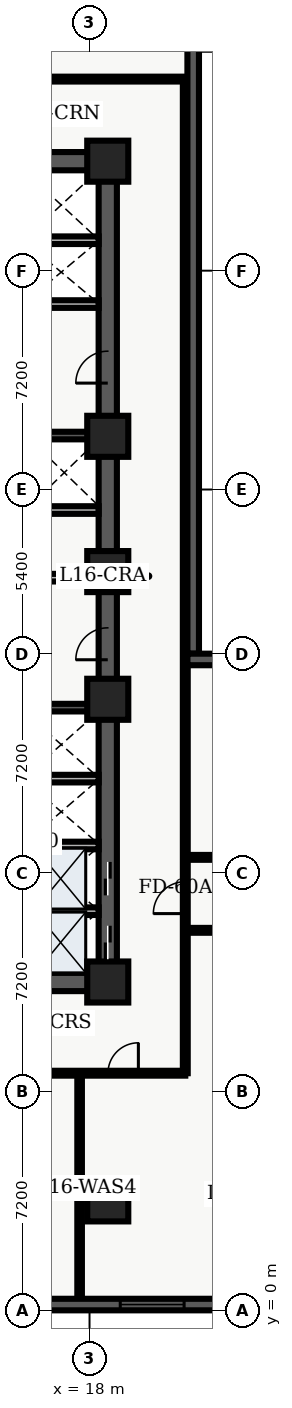
"""IFC4 building model, lengths in metres.
Left out: names, types, materials, properties, quantities, classifications, styles, units other than length and angle.
Written with IfcOpenShell. Run it as: python <this file> out.ifc"""

import sys

from ifc_helpers import new_model, entity, si_unit, converted_unit, direction, frame, origin_with_axes, origin_2d_with_axis, place, context, subcontext, project, spatial, polyline, rectangle, outline, extrude, element, fill, save


model = new_model("IFC4")
c1 = context("Model", 3, precision=1e-05, world=origin_with_axes(), true_north=direction((0.0, 1.0)))
c2 = subcontext(c1, "Body", "Model", "MODEL_VIEW")
j1 = project(units=[si_unit("LENGTHUNIT", "METRE"), converted_unit("PLANEANGLEUNIT", "DEGREE", entity("IfcPlaneAngleMeasure", 0.017), si_unit("PLANEANGLEUNIT", "RADIAN"), dimensions=[0, 0, 0, 0, 0, 0, 0])], contexts=[c1])
p1 = place(None, origin_with_axes())
s1 = spatial("IfcSite", under=j1, at=p1, CompositionType="ELEMENT")
p2 = place(p1, origin_with_axes())
s2 = spatial("IfcBuilding", under=s1, at=p2, CompositionType="ELEMENT")
p3 = place(p2, frame((0.0, 0.0, 67.8), z_axis=(0.0, 0.0, 1.0), x_axis=(1.0, 0.0, 0.0)))
s3 = spatial("IfcBuildingStorey", under=s2, at=p3, CompositionType="ELEMENT", Elevation=67.8)
p4 = place(p3, frame((11.4, 10.8, 0.0), z_axis=(0.0, 0.0, 1.0), x_axis=(1.0, 0.0, 0.0)))
e1 = element("IfcWall", 1, at=p4, inside=s3, PredefinedType="SHEAR", context=c2, shape_type="SweptSolid", body=[
    extrude(outline(polyline([(0.0, -0.3), (7.2, -0.3), (7.2, 0.3), (0.0, 0.3), (0.0, -0.3)])), origin_with_axes(), (0.0, 0.0, 1.0), 3.66),
])
p5 = place(p4, frame((2.625, 0.0, 0.0), z_axis=(0.0, 0.0, 1.0), x_axis=(1.0, 0.0, 0.0)))
e2 = element("IfcOpeningElement", 2, at=p5, cuts=e1, PredefinedType="OPENING", context=c2, shape_type="SweptSolid", body=[
    extrude(rectangle(XDim=1.05, YDim=0.62, at=origin_2d_with_axis()), origin_with_axes(), (0.0, 0.0, 1.0), 2.15),
])
p6 = place(p3, frame((11.4, 37.8, 0.0), z_axis=(0.0, 0.0, 1.0), x_axis=(1.0, 0.0, 0.0)))
e3 = element("IfcWall", 3, at=p6, inside=s3, PredefinedType="SHEAR", context=c2, shape_type="SweptSolid", body=[
    extrude(outline(polyline([(0.0, -0.3), (7.2, -0.3), (7.2, 0.3), (0.0, 0.3), (0.0, -0.3)])), origin_with_axes(), (0.0, 0.0, 1.0), 3.66),
])
p7 = place(p6, frame((2.625, 0.0, 0.0), z_axis=(0.0, 0.0, 1.0), x_axis=(1.0, 0.0, 0.0)))
e4 = element("IfcOpeningElement", 4, at=p7, cuts=e3, PredefinedType="OPENING", context=c2, shape_type="SweptSolid", body=[
    extrude(rectangle(XDim=1.05, YDim=0.62, at=origin_2d_with_axis()), origin_with_axes(), (0.0, 0.0, 1.0), 2.15),
])
p8 = place(p3, frame((18.6, 10.8, 0.0), z_axis=(0.0, 0.0, 1.0), x_axis=(0.0, 1.0, 0.0)))
e5 = element("IfcWall", 5, at=p8, inside=s3, PredefinedType="SHEAR", context=c2, shape_type="SweptSolid", body=[
    extrude(outline(polyline([(0.0, -0.3), (13.5, -0.3), (13.5, 0.3), (0.0, 0.3), (0.0, -0.3)])), origin_with_axes(), (0.0, 0.0, 1.0), 3.66),
])
p9 = place(p8, frame((1.3, 0.0, 0.0), z_axis=(0.0, 0.0, 1.0), x_axis=(1.0, 0.0, 0.0)))
e6 = element("IfcOpeningElement", 6, at=p9, cuts=e5, PredefinedType="OPENING", context=c2, shape_type="SweptSolid", body=[
    extrude(rectangle(XDim=1.1, YDim=0.62, at=origin_2d_with_axis()), origin_with_axes(), (0.0, 0.0, 1.0), 2.15),
])
p10 = place(p8, frame((3.4, 0.0, 0.0), z_axis=(0.0, 0.0, 1.0), x_axis=(1.0, 0.0, 0.0)))
e7 = element("IfcOpeningElement", 7, at=p10, cuts=e5, PredefinedType="OPENING", context=c2, shape_type="SweptSolid", body=[
    extrude(rectangle(XDim=1.1, YDim=0.62, at=origin_2d_with_axis()), origin_with_axes(), (0.0, 0.0, 1.0), 2.15),
])
p11 = place(p8, frame((11.125, 0.0, 0.0), z_axis=(0.0, 0.0, 1.0), x_axis=(1.0, 0.0, 0.0)))
e8 = element("IfcOpeningElement", 8, at=p11, cuts=e5, PredefinedType="OPENING", context=c2, shape_type="SweptSolid", body=[
    extrude(rectangle(XDim=1.05, YDim=0.62, at=origin_2d_with_axis()), origin_with_axes(), (0.0, 0.0, 1.0), 2.15),
])
p12 = place(p3, frame((18.6, 24.3, 0.0), z_axis=(0.0, 0.0, 1.0), x_axis=(0.0, 1.0, 0.0)))
e9 = element("IfcWall", 9, at=p12, inside=s3, PredefinedType="SHEAR", context=c2, shape_type="SweptSolid", body=[
    extrude(outline(polyline([(0.0, -0.3), (13.5, -0.3), (13.5, 0.3), (0.0, 0.3), (0.0, -0.3)])), origin_with_axes(), (0.0, 0.0, 1.0), 3.66),
])
p13 = place(p12, frame((6.725, 0.0, 0.0), z_axis=(0.0, 0.0, 1.0), x_axis=(1.0, 0.0, 0.0)))
e10 = element("IfcOpeningElement", 10, at=p13, cuts=e9, PredefinedType="OPENING", context=c2, shape_type="SweptSolid", body=[
    extrude(rectangle(XDim=1.05, YDim=0.62, at=origin_2d_with_axis()), origin_with_axes(), (0.0, 0.0, 1.0), 2.15),
])
for number, where, z_axis, x_axis in (
    (11, (11.7, 19.825, 0.0), (0.0, 0.0, 1.0), (1.0, 0.0, 0.0)),
    (12, (11.7, 28.775, 0.0), (0.0, 0.0, 1.0), (1.0, 0.0, 0.0)),
):
    element("IfcWall", number, at=place(p3, frame(where, z_axis=z_axis, x_axis=x_axis)), inside=s3, PredefinedType="SHEAR", context=c2, shape_type="SweptSolid", body=[
        extrude(outline(polyline([(0.0, -0.125), (6.6, -0.125), (6.6, 0.125), (0.0, 0.125), (0.0, -0.125)])), origin_with_axes(), (0.0, 0.0, 1.0), 3.66),
    ])
p14 = place(p3, frame((11.7, 24.1, 0.0), z_axis=(0.0, 0.0, 1.0), x_axis=(1.0, 0.0, 0.0)))
e13 = element("IfcWall", 13, at=p14, inside=s3, PredefinedType="SOLIDWALL", context=c2, shape_type="SweptSolid", body=[
    extrude(outline(polyline([(0.0, -0.125), (6.6, -0.125), (6.6, 0.125), (0.0, 0.125), (0.0, -0.125)])), origin_with_axes(), (0.0, 0.0, 1.0), 2.7),
])
p15 = place(p14, frame((3.75, 0.0, 0.0), z_axis=(0.0, 0.0, 1.0), x_axis=(1.0, 0.0, 0.0)))
e14 = element("IfcOpeningElement", 14, at=p15, cuts=e13, PredefinedType="OPENING", context=c2, shape_type="SweptSolid", body=[
    extrude(rectangle(XDim=0.9, YDim=0.27, at=origin_2d_with_axis()), origin_with_axes(), (0.0, 0.0, 1.0), 2.15),
])
p16 = place(p3, frame((11.7, 26.325, 0.0), z_axis=(0.0, 0.0, 1.0), x_axis=(1.0, 0.0, 0.0)))
e15 = element("IfcWall", 15, at=p16, inside=s3, PredefinedType="SOLIDWALL", context=c2, shape_type="SweptSolid", body=[
    extrude(outline(polyline([(0.0, -0.125), (6.6, -0.125), (6.6, 0.125), (0.0, 0.125), (0.0, -0.125)])), origin_with_axes(), (0.0, 0.0, 1.0), 2.7),
])
p17 = place(p16, frame((3.5, 0.0, 0.0), z_axis=(0.0, 0.0, 1.0), x_axis=(1.0, 0.0, 0.0)))
e16 = element("IfcOpeningElement", 16, at=p17, cuts=e15, PredefinedType="OPENING", context=c2, shape_type="SweptSolid", body=[
    extrude(rectangle(XDim=0.9, YDim=0.27, at=origin_2d_with_axis()), origin_with_axes(), (0.0, 0.0, 1.0), 2.15),
])
for number, where, z_axis, x_axis in (
    (17, (18.6, 3.6, 0.0), (0.0, 0.0, 1.0), (1.0, 0.0, 0.0)),
    (18, (18.6, 10.8, 0.0), (0.0, 0.0, 1.0), (1.0, 0.0, 0.0)),
    (19, (18.6, 20.1, 0.0), (0.0, 0.0, 1.0), (1.0, 0.0, 0.0)),
    (20, (18.6, 24.3, 0.0), (0.0, 0.0, 1.0), (1.0, 0.0, 0.0)),
    (21, (18.6, 28.75, 0.0), (0.0, 0.0, 1.0), (1.0, 0.0, 0.0)),
    (22, (18.6, 37.8, 0.0), (0.0, 0.0, 1.0), (1.0, 0.0, 0.0)),
):
    element("IfcColumn", number, at=place(p3, frame(where, z_axis=z_axis, x_axis=x_axis)), inside=s3, PredefinedType="COLUMN", context=c2, shape_type="SweptSolid", body=[
        extrude(rectangle(XDim=1.35, YDim=1.35, at=origin_2d_with_axis()), origin_with_axes(), (0.0, 0.0, 1.0), 3.9),
    ])
for number, where, z_axis, x_axis in (
    (23, (15.84, 13.13, 0.0), (0.0, 0.0, 1.0), (1.0, 0.0, 0.0)),
    (24, (15.84, 15.29, 0.0), (0.0, 0.0, 1.0), (1.0, 0.0, 0.0)),
    (25, (15.84, 17.49, 0.0), (0.0, 0.0, 1.0), (1.0, 0.0, 0.0)),
    (26, (15.84, 33.1, 0.0), (0.0, 0.0, 1.0), (1.0, 0.0, 0.0)),
    (27, (15.84, 35.2, 0.0), (0.0, 0.0, 1.0), (1.0, 0.0, 0.0)),
):
    element("IfcWall", number, at=place(p3, frame(where, z_axis=z_axis, x_axis=x_axis)), inside=s3, PredefinedType="SOLIDWALL", context=c2, shape_type="SweptSolid", body=[
        extrude(outline(polyline([(0.0, -0.125), (2.46, -0.125), (2.46, 0.125), (0.0, 0.125), (0.0, -0.125)])), origin_with_axes(), (0.0, 0.0, 1.0), 2.7),
    ])
p18 = place(p3, frame((2.6, 7.8, 0.0), z_axis=(0.0, 0.0, 1.0), x_axis=(1.0, 0.0, 0.0)))
e28 = element("IfcWall", 28, at=p18, inside=s3, PredefinedType="PARTITIONING", context=c2, shape_type="SweptSolid", body=[
    extrude(outline(polyline([(0.0, -0.08), (18.55, -0.08), (18.55, 0.08), (0.0, 0.08), (0.0, -0.08)])), origin_with_axes(), (0.0, 0.0, 1.0), 2.7),
])
p19 = place(p18, frame((2.149, 0.0, 0.0), z_axis=(0.0, 0.0, 1.0), x_axis=(1.0, 0.0, 0.0)))
e29 = element("IfcOpeningElement", 29, at=p19, cuts=e28, PredefinedType="OPENING", context=c2, shape_type="SweptSolid", body=[
    extrude(rectangle(XDim=1.0, YDim=0.18, at=origin_2d_with_axis()), origin_with_axes(), (0.0, 0.0, 1.0), 2.15),
])
p20 = place(p18, frame((6.554, 0.0, 0.0), z_axis=(0.0, 0.0, 1.0), x_axis=(1.0, 0.0, 0.0)))
e30 = element("IfcOpeningElement", 30, at=p20, cuts=e28, PredefinedType="OPENING", context=c2, shape_type="SweptSolid", body=[
    extrude(rectangle(XDim=1.0, YDim=0.18, at=origin_2d_with_axis()), origin_with_axes(), (0.0, 0.0, 1.0), 2.15),
])
p21 = place(p18, frame((11.937, 0.0, 0.0), z_axis=(0.0, 0.0, 1.0), x_axis=(1.0, 0.0, 0.0)))
e31 = element("IfcOpeningElement", 31, at=p21, cuts=e28, PredefinedType="OPENING", context=c2, shape_type="SweptSolid", body=[
    extrude(rectangle(XDim=1.0, YDim=0.18, at=origin_2d_with_axis()), origin_with_axes(), (0.0, 0.0, 1.0), 2.15),
])
p22 = place(p18, frame((16.507, 0.0, 0.0), z_axis=(0.0, 0.0, 1.0), x_axis=(1.0, 0.0, 0.0)))
e32 = element("IfcOpeningElement", 32, at=p22, cuts=e28, PredefinedType="OPENING", context=c2, shape_type="SweptSolid", body=[
    extrude(rectangle(XDim=1.0, YDim=0.18, at=origin_2d_with_axis()), origin_with_axes(), (0.0, 0.0, 1.0), 2.15),
])
p23 = place(p3, frame((2.6, 40.5, 0.0), z_axis=(0.0, 0.0, 1.0), x_axis=(1.0, 0.0, 0.0)))
e33 = element("IfcWall", 33, at=p23, inside=s3, PredefinedType="PARTITIONING", context=c2, shape_type="SweptSolid", body=[
    extrude(outline(polyline([(0.0, -0.08), (18.65, -0.08), (18.65, 0.08), (0.0, 0.08), (0.0, -0.08)])), origin_with_axes(), (0.0, 0.0, 1.0), 2.7),
])
p24 = place(p23, frame((6.045, 0.0, 0.0), z_axis=(0.0, 0.0, 1.0), x_axis=(1.0, 0.0, 0.0)))
e34 = element("IfcOpeningElement", 34, at=p24, cuts=e33, PredefinedType="OPENING", context=c2, shape_type="SweptSolid", body=[
    extrude(rectangle(XDim=1.0, YDim=0.18, at=origin_2d_with_axis()), origin_with_axes(), (0.0, 0.0, 1.0), 2.15),
])
p25 = place(p23, frame((12.61, 0.0, 0.0), z_axis=(0.0, 0.0, 1.0), x_axis=(1.0, 0.0, 0.0)))
e35 = element("IfcOpeningElement", 35, at=p25, cuts=e33, PredefinedType="OPENING", context=c2, shape_type="SweptSolid", body=[
    extrude(rectangle(XDim=1.2, YDim=0.18, at=origin_2d_with_axis()), origin_with_axes(), (0.0, 0.0, 1.0), 2.2),
])
p26 = place(p3, frame((21.15, 7.8, 0.0), z_axis=(0.0, 0.0, 1.0), x_axis=(0.0, 1.0, 0.0)))
e36 = element("IfcWall", 36, at=p26, inside=s3, PredefinedType="PARTITIONING", context=c2, shape_type="SweptSolid", body=[
    extrude(outline(polyline([(0.0, -0.08), (32.7, -0.08), (32.7, 0.08), (0.0, 0.08), (0.0, -0.08)])), origin_with_axes(), (0.0, 0.0, 1.0), 2.7),
])
p27 = place(p26, frame((5.775, 0.0, 0.0), z_axis=(0.0, 0.0, 1.0), x_axis=(1.0, 0.0, 0.0)))
e37 = element("IfcOpeningElement", 37, at=p27, cuts=e36, PredefinedType="OPENING", context=c2, shape_type="SweptSolid", body=[
    extrude(rectangle(XDim=1.05, YDim=0.18, at=origin_2d_with_axis()), origin_with_axes(), (0.0, 0.0, 1.0), 2.15),
])
p28 = place(p3, frame((17.674, 0.36, 0.0), z_axis=(0.0, 0.0, 1.0), x_axis=(0.0, 1.0, 0.0)))
e38 = element("IfcWall", 38, at=p28, inside=s3, PredefinedType="PARTITIONING", context=c2, shape_type="SweptSolid", body=[
    extrude(outline(polyline([(0.0, -0.075), (7.34, -0.075), (7.34, 0.075), (0.0, 0.075), (0.0, -0.075)])), origin_with_axes(), (0.0, 0.0, 1.0), 2.7),
])
p29 = place(p3, frame((21.15, 12.5, 0.0), z_axis=(0.0, 0.0, 1.0), x_axis=(1.0, 0.0, 0.0)))
e39 = element("IfcWall", 39, at=p29, inside=s3, PredefinedType="PARTITIONING", context=c2, shape_type="SweptSolid", body=[
    extrude(outline(polyline([(0.0, -0.08), (15.2, -0.08), (15.2, 0.08), (0.0, 0.08), (0.0, -0.08)])), origin_with_axes(), (0.0, 0.0, 1.0), 2.7),
])
p30 = place(p29, frame((7.65, 0.0, 0.0), z_axis=(0.0, 0.0, 1.0), x_axis=(1.0, 0.0, 0.0)))
e40 = element("IfcOpeningElement", 40, at=p30, cuts=e39, PredefinedType="OPENING", context=c2, shape_type="SweptSolid", body=[
    extrude(rectangle(XDim=1.0, YDim=0.18, at=origin_2d_with_axis()), origin_with_axes(), (0.0, 0.0, 1.0), 2.15),
])
p31 = place(p3, frame((21.15, 14.9, 0.0), z_axis=(0.0, 0.0, 1.0), x_axis=(1.0, 0.0, 0.0)))
e41 = element("IfcWall", 41, at=p31, inside=s3, PredefinedType="PARTITIONING", context=c2, shape_type="SweptSolid", body=[
    extrude(outline(polyline([(0.0, -0.08), (15.2, -0.08), (15.2, 0.08), (0.0, 0.08), (0.0, -0.08)])), origin_with_axes(), (0.0, 0.0, 1.0), 2.7),
])
p32 = place(p31, frame((3.315, 0.0, 0.0), z_axis=(0.0, 0.0, 1.0), x_axis=(1.0, 0.0, 0.0)))
e42 = element("IfcOpeningElement", 42, at=p32, cuts=e41, PredefinedType="OPENING", context=c2, shape_type="SweptSolid", body=[
    extrude(rectangle(XDim=1.0, YDim=0.18, at=origin_2d_with_axis()), origin_with_axes(), (0.0, 0.0, 1.0), 2.15),
])
p33 = place(p31, frame((7.632, 0.0, 0.0), z_axis=(0.0, 0.0, 1.0), x_axis=(1.0, 0.0, 0.0)))
e43 = element("IfcOpeningElement", 43, at=p33, cuts=e41, PredefinedType="OPENING", context=c2, shape_type="SweptSolid", body=[
    extrude(rectangle(XDim=1.0, YDim=0.18, at=origin_2d_with_axis()), origin_with_axes(), (0.0, 0.0, 1.0), 2.15),
])
p34 = place(p31, frame((10.3, 0.0, 0.0), z_axis=(0.0, 0.0, 1.0), x_axis=(1.0, 0.0, 0.0)))
e44 = element("IfcOpeningElement", 44, at=p34, cuts=e41, PredefinedType="OPENING", context=c2, shape_type="SweptSolid", body=[
    extrude(rectangle(XDim=1.0, YDim=0.18, at=origin_2d_with_axis()), origin_with_axes(), (0.0, 0.0, 1.0), 2.15),
])
p35 = place(p31, frame((13.453, 0.0, 0.0), z_axis=(0.0, 0.0, 1.0), x_axis=(1.0, 0.0, 0.0)))
e45 = element("IfcOpeningElement", 45, at=p35, cuts=e41, PredefinedType="OPENING", context=c2, shape_type="SweptSolid", body=[
    extrude(rectangle(XDim=1.0, YDim=0.18, at=origin_2d_with_axis()), origin_with_axes(), (0.0, 0.0, 1.0), 2.15),
])
p36 = place(p3, frame((57.22, 0.19, 0.0), z_axis=(0.0, 0.0, 1.0), x_axis=(-1.0, 0.0, 0.0)))
e46 = element("IfcWall", 46, at=p36, inside=s3, PredefinedType="SOLIDWALL", context=c2, shape_type="SweptSolid", body=[
    extrude(outline(polyline([(0.0, -0.19), (54.82, -0.19), (54.82, 0.19), (0.0, 0.19), (0.0, -0.19)])), origin_with_axes(), (0.0, 0.0, 1.0), 3.66),
])
p37 = place(p36, frame((3.037, 0.0, 0.45), z_axis=(0.0, 0.0, 1.0), x_axis=(1.0, 0.0, 0.0)))
e47 = element("IfcOpeningElement", 47, at=p37, cuts=e46, PredefinedType="OPENING", context=c2, shape_type="SweptSolid", body=[
    extrude(rectangle(XDim=2.1, YDim=0.4, at=origin_2d_with_axis()), origin_with_axes(), (0.0, 0.0, 1.0), 2.2),
])
p38 = place(p36, frame((7.912, 0.0, 0.45), z_axis=(0.0, 0.0, 1.0), x_axis=(1.0, 0.0, 0.0)))
e48 = element("IfcOpeningElement", 48, at=p38, cuts=e46, PredefinedType="OPENING", context=c2, shape_type="SweptSolid", body=[
    extrude(rectangle(XDim=2.1, YDim=0.4, at=origin_2d_with_axis()), origin_with_axes(), (0.0, 0.0, 1.0), 2.2),
])
p39 = place(p36, frame((12.786, 0.0, 0.45), z_axis=(0.0, 0.0, 1.0), x_axis=(1.0, 0.0, 0.0)))
e49 = element("IfcOpeningElement", 49, at=p39, cuts=e46, PredefinedType="OPENING", context=c2, shape_type="SweptSolid", body=[
    extrude(rectangle(XDim=2.1, YDim=0.4, at=origin_2d_with_axis()), origin_with_axes(), (0.0, 0.0, 1.0), 2.2),
])
p40 = place(p36, frame((17.661, 0.0, 0.45), z_axis=(0.0, 0.0, 1.0), x_axis=(1.0, 0.0, 0.0)))
e50 = element("IfcOpeningElement", 50, at=p40, cuts=e46, PredefinedType="OPENING", context=c2, shape_type="SweptSolid", body=[
    extrude(rectangle(XDim=2.1, YDim=0.4, at=origin_2d_with_axis()), origin_with_axes(), (0.0, 0.0, 1.0), 2.2),
])
p41 = place(p36, frame((22.535, 0.0, 0.45), z_axis=(0.0, 0.0, 1.0), x_axis=(1.0, 0.0, 0.0)))
e51 = element("IfcOpeningElement", 51, at=p41, cuts=e46, PredefinedType="OPENING", context=c2, shape_type="SweptSolid", body=[
    extrude(rectangle(XDim=2.1, YDim=0.4, at=origin_2d_with_axis()), origin_with_axes(), (0.0, 0.0, 1.0), 2.2),
])
p42 = place(p36, frame((27.41, 0.0, 0.45), z_axis=(0.0, 0.0, 1.0), x_axis=(1.0, 0.0, 0.0)))
e52 = element("IfcOpeningElement", 52, at=p42, cuts=e46, PredefinedType="OPENING", context=c2, shape_type="SweptSolid", body=[
    extrude(rectangle(XDim=2.1, YDim=0.4, at=origin_2d_with_axis()), origin_with_axes(), (0.0, 0.0, 1.0), 2.2),
])
p43 = place(p36, frame((32.285, 0.0, 0.45), z_axis=(0.0, 0.0, 1.0), x_axis=(1.0, 0.0, 0.0)))
e53 = element("IfcOpeningElement", 53, at=p43, cuts=e46, PredefinedType="OPENING", context=c2, shape_type="SweptSolid", body=[
    extrude(rectangle(XDim=2.1, YDim=0.4, at=origin_2d_with_axis()), origin_with_axes(), (0.0, 0.0, 1.0), 2.2),
])
p44 = place(p36, frame((37.159, 0.0, 0.45), z_axis=(0.0, 0.0, 1.0), x_axis=(1.0, 0.0, 0.0)))
e54 = element("IfcOpeningElement", 54, at=p44, cuts=e46, PredefinedType="OPENING", context=c2, shape_type="SweptSolid", body=[
    extrude(rectangle(XDim=2.1, YDim=0.4, at=origin_2d_with_axis()), origin_with_axes(), (0.0, 0.0, 1.0), 2.2),
])
p45 = place(p36, frame((42.034, 0.0, 0.45), z_axis=(0.0, 0.0, 1.0), x_axis=(1.0, 0.0, 0.0)))
e55 = element("IfcOpeningElement", 55, at=p45, cuts=e46, PredefinedType="OPENING", context=c2, shape_type="SweptSolid", body=[
    extrude(rectangle(XDim=2.1, YDim=0.4, at=origin_2d_with_axis()), origin_with_axes(), (0.0, 0.0, 1.0), 2.2),
])
p46 = place(p36, frame((47.758, 0.0, 0.45), z_axis=(0.0, 0.0, 1.0), x_axis=(1.0, 0.0, 0.0)))
e56 = element("IfcOpeningElement", 56, at=p46, cuts=e46, PredefinedType="OPENING", context=c2, shape_type="SweptSolid", body=[
    extrude(rectangle(XDim=2.1, YDim=0.4, at=origin_2d_with_axis()), origin_with_axes(), (0.0, 0.0, 1.0), 2.2),
])
p47 = place(p36, frame((52.233, 0.0, 0.45), z_axis=(0.0, 0.0, 1.0), x_axis=(1.0, 0.0, 0.0)))
e57 = element("IfcOpeningElement", 57, at=p47, cuts=e46, PredefinedType="OPENING", context=c2, shape_type="SweptSolid", body=[
    extrude(rectangle(XDim=2.1, YDim=0.4, at=origin_2d_with_axis()), origin_with_axes(), (0.0, 0.0, 1.0), 2.2),
])
p48 = place(p3, frame((21.41, 45.82, 0.0), z_axis=(0.0, 0.0, 1.0), x_axis=(0.0, -1.0, 0.0)))
e58 = element("IfcWall", 58, at=p48, inside=s3, PredefinedType="SOLIDWALL", context=c2, shape_type="SweptSolid", body=[
    extrude(outline(polyline([(0.0, -0.19), (24.22, -0.19), (24.22, 0.19), (0.0, 0.19), (0.0, -0.19)])), origin_with_axes(), (0.0, 0.0, 1.0), 3.66),
])
p49 = place(p48, frame((2.902, 0.0, 0.45), z_axis=(0.0, 0.0, 1.0), x_axis=(1.0, 0.0, 0.0)))
e59 = element("IfcOpeningElement", 59, at=p49, cuts=e58, PredefinedType="OPENING", context=c2, shape_type="SweptSolid", body=[
    extrude(rectangle(XDim=2.1, YDim=0.4, at=origin_2d_with_axis()), origin_with_axes(), (0.0, 0.0, 1.0), 2.2),
])
p50 = place(p3, frame((21.22, 21.41, 0.0), z_axis=(0.0, 0.0, 1.0), x_axis=(1.0, 0.0, 0.0)))
e60 = element("IfcWall", 60, at=p50, inside=s3, PredefinedType="SOLIDWALL", context=c2, shape_type="SweptSolid", body=[
    extrude(outline(polyline([(0.0, -0.19), (17.18, -0.19), (17.18, 0.19), (0.0, 0.19), (0.0, -0.19)])), origin_with_axes(), (0.0, 0.0, 1.0), 3.66),
])
p51 = place(p50, frame((3.263, 0.0, 0.45), z_axis=(0.0, 0.0, 1.0), x_axis=(1.0, 0.0, 0.0)))
e61 = element("IfcOpeningElement", 61, at=p51, cuts=e60, PredefinedType="OPENING", context=c2, shape_type="SweptSolid", body=[
    extrude(rectangle(XDim=2.1, YDim=0.4, at=origin_2d_with_axis()), origin_with_axes(), (0.0, 0.0, 1.0), 2.2),
])
p52 = place(p50, frame((13.467, 0.0, 0.45), z_axis=(0.0, 0.0, 1.0), x_axis=(1.0, 0.0, 0.0)))
e62 = element("IfcOpeningElement", 62, at=p52, cuts=e60, PredefinedType="OPENING", context=c2, shape_type="SweptSolid", body=[
    extrude(rectangle(XDim=2.1, YDim=0.4, at=origin_2d_with_axis()), origin_with_axes(), (0.0, 0.0, 1.0), 2.2),
])
p53 = place(p8, frame((1.3, 0.0, 0.0), z_axis=(0.0, 0.0, 1.0), x_axis=(1.0, 0.0, 0.0)))
e63 = element("IfcDoor", 63, at=p53, inside=s3, OperationType="SLIDING_TO_LEFT", PredefinedType="DOOR", context=c2, shape_type="SweptSolid", body=[
    extrude(rectangle(XDim=1.1, YDim=0.09, at=origin_2d_with_axis()), origin_with_axes(), (0.0, 0.0, 1.0), 2.15),
])
fill(e6, e63)
p54 = place(p8, frame((3.4, 0.0, 0.0), z_axis=(0.0, 0.0, 1.0), x_axis=(1.0, 0.0, 0.0)))
e64 = element("IfcDoor", 64, at=p54, inside=s3, OperationType="SLIDING_TO_RIGHT", PredefinedType="DOOR", context=c2, shape_type="SweptSolid", body=[
    extrude(rectangle(XDim=1.1, YDim=0.09, at=origin_2d_with_axis()), origin_with_axes(), (0.0, 0.0, 1.0), 2.15),
])
fill(e7, e64)
p55 = place(p8, frame((11.125, 0.0, 0.0), z_axis=(0.0, 0.0, 1.0), x_axis=(1.0, 0.0, 0.0)))
e65 = element("IfcDoor", 65, at=p55, inside=s3, OperationType="SINGLE_SWING_LEFT", PredefinedType="DOOR", context=c2, shape_type="SweptSolid", body=[
    extrude(rectangle(XDim=1.05, YDim=0.09, at=origin_2d_with_axis()), origin_with_axes(), (0.0, 0.0, 1.0), 2.15),
])
fill(e8, e65)
p56 = place(p12, frame((6.725, 0.0, 0.0), z_axis=(0.0, 0.0, 1.0), x_axis=(1.0, 0.0, 0.0)))
e66 = element("IfcDoor", 66, at=p56, inside=s3, OperationType="SINGLE_SWING_LEFT", PredefinedType="DOOR", context=c2, shape_type="SweptSolid", body=[
    extrude(rectangle(XDim=1.05, YDim=0.09, at=origin_2d_with_axis()), origin_with_axes(), (0.0, 0.0, 1.0), 2.15),
])
fill(e10, e66)
p57 = place(p18, frame((16.507, 0.0, 0.0), z_axis=(0.0, 0.0, 1.0), x_axis=(1.0, 0.0, 0.0)))
e67 = element("IfcDoor", 67, at=p57, inside=s3, OperationType="SINGLE_SWING_RIGHT", PredefinedType="DOOR", context=c2, shape_type="SweptSolid", body=[
    extrude(rectangle(XDim=1.0, YDim=0.09, at=origin_2d_with_axis()), origin_with_axes(), (0.0, 0.0, 1.0), 2.15),
])
fill(e32, e67)
p58 = place(p26, frame((5.775, 0.0, 0.0), z_axis=(0.0, 0.0, 1.0), x_axis=(1.0, 0.0, 0.0)))
e68 = element("IfcDoor", 68, at=p58, inside=s3, OperationType="SINGLE_SWING_LEFT", PredefinedType="DOOR", context=c2, shape_type="SweptSolid", body=[
    extrude(rectangle(XDim=1.05, YDim=0.09, at=origin_2d_with_axis()), origin_with_axes(), (0.0, 0.0, 1.0), 2.15),
])
fill(e37, e68)
p59 = place(p36, frame((37.159, 0.0, 0.45), z_axis=(0.0, 0.0, 1.0), x_axis=(1.0, 0.0, 0.0)))
e69 = element("IfcWindow", 69, at=p59, inside=s3, PredefinedType="WINDOW", context=c2, shape_type="SweptSolid", body=[
    extrude(rectangle(XDim=2.1, YDim=0.09, at=origin_2d_with_axis()), origin_with_axes(), (0.0, 0.0, 1.0), 2.2),
])
fill(e54, e69)
save(model, sys.argv[1])
